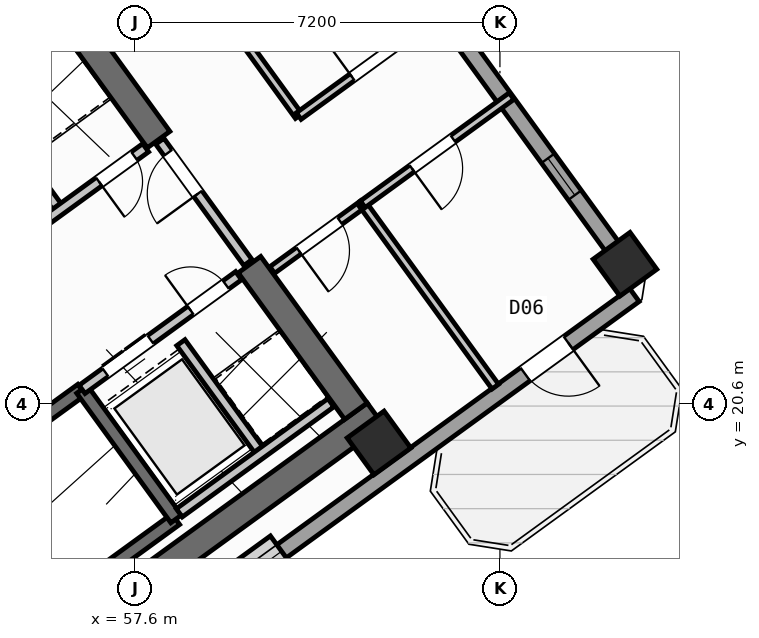
"""IFC4 building model, lengths in metres.
Left out: names, types, materials, properties, quantities, classifications, styles, units other than length and angle.
Written with IfcOpenShell. Run it as: python <this file> out.ifc"""

import sys

from ifc_helpers import new_model, si_unit, direction, frame, frame_2d, origin, origin_2d, place, context, subcontext, project, spatial, rectangle, hollow_rectangle, extrude, source, transform, mapped, element, fill, save


model = new_model("IFC4")
c1 = context("Model", 3, precision=1e-05, world=origin(), true_north=direction((0.0, 1.0)))
c2 = subcontext(c1, "Body", "Model", "MODEL_VIEW")
j1 = project(units=[si_unit("LENGTHUNIT", "METRE"), si_unit("PLANEANGLEUNIT", "RADIAN")], contexts=[c1])
p1 = place(None, origin())
s1 = spatial("IfcSite", under=j1, at=p1, CompositionType="ELEMENT")
p2 = place(p1, origin())
s2 = spatial("IfcBuilding", under=s1, at=p2, CompositionType="ELEMENT")
p3 = place(p2, frame((0.0, 0.0, 123.3)))
s3 = spatial("IfcBuildingStorey", under=s2, at=p3, CompositionType="ELEMENT", Elevation=123.3)
p4 = place(p3, frame((52.359, 13.14, 0.0), z_axis=(0.0, 0.0, 1.0), x_axis=(0.809014896919, 0.587788139183, 0.0)))
e1 = element("IfcWall", 1, at=p4, inside=s3, PredefinedType="SHEAR", context=c2, shape_type="SweptSolid", body=[
    extrude(rectangle(XDim=12.34, YDim=0.55, at=frame_2d((6.17, 0.0))), origin(), (0.0, 0.0, 1.0), 4.22),
])
p5 = place(p3, frame((61.958, 20.454, 0.0), z_axis=(0.0, 0.0, 1.0), x_axis=(-0.587802113096, 0.809004744015, 0.0)))
e2 = element("IfcWall", 2, at=p5, inside=s3, PredefinedType="SHEAR", context=c2, shape_type="SweptSolid", body=[
    extrude(rectangle(XDim=3.575, YDim=0.55, at=frame_2d((1.788, 0.0))), origin(), (0.0, 0.0, 1.0), 4.22),
])
p6 = place(p3, frame((58.064, 25.813, 0.0), z_axis=(0.0, 0.0, 1.0), x_axis=(-0.587764933797, 0.809031756236, 0.0)))
e3 = element("IfcWall", 3, at=p6, inside=s3, PredefinedType="SHEAR", context=c2, shape_type="SweptSolid", body=[
    extrude(rectangle(XDim=6.425, YDim=0.55, at=frame_2d((3.212, 0.0))), origin(), (0.0, 0.0, 1.0), 4.22),
])
m1 = source(origin(), c2, "Body", "SweptSolid", [
    extrude(hollow_rectangle(XDim=0.9, YDim=0.9, WallThickness=0.036, at=origin_2d()), origin(), (0.0, 0.0, 1.0), 4.5),
])
for number, where, z_axis, x_axis in (
    (4, (62.414, 19.827, 0.0), (0.0, 0.0, 1.0), (0.809, 0.588, 0.0)),
    (5, (67.268, 23.354, 0.0), (0.0, 0.0, 1.0), (0.809, 0.588, 0.0)),
):
    element("IfcColumn", number, at=place(p3, frame(where, z_axis=z_axis, x_axis=x_axis)), inside=s3, PredefinedType="COLUMN", context=c2, shape_type="MappedRepresentation", body=[
        mapped(m1, transform((0.0, 0.0, 0.0), scale=1.0)),
    ])
p7 = place(p3, frame((54.81, 40.5, 0.0), z_axis=(0.0, 0.0, 1.0), x_axis=(0.587783625747, -0.809018176127, 0.0)))
e6 = element("IfcWall", 6, at=p7, inside=s3, PredefinedType="STANDARD", context=c2, shape_type="SweptSolid", body=[
    extrude(rectangle(XDim=21.587, YDim=0.32, at=frame_2d((10.794, 0.0))), origin(), (0.0, 0.0, 1.0), 2.395),
])
p8 = place(p7, frame((1.681, 0.0, 1.0)))
e7 = element("IfcOpeningElement", 7, at=p8, cuts=e6, PredefinedType="OPENING", context=c2, shape_type="SweptSolid", body=[
    extrude(rectangle(XDim=0.9, YDim=1.25, at=frame_2d((0.45, 0.625))), frame((0.0, 0.17, 0.0), z_axis=(0.0, -1.0, 0.0), x_axis=(1.0, 0.0, 0.0)), (0.0, 0.0, 1.0), 0.34),
])
p9 = place(p7, frame((3.805, 0.0, 1.0)))
e8 = element("IfcOpeningElement", 8, at=p9, cuts=e6, PredefinedType="OPENING", context=c2, shape_type="SweptSolid", body=[
    extrude(rectangle(XDim=0.9, YDim=1.25, at=frame_2d((0.45, 0.625))), frame((0.0, 0.17, 0.0), z_axis=(0.0, -1.0, 0.0), x_axis=(1.0, 0.0, 0.0)), (0.0, 0.0, 1.0), 0.34),
])
p10 = place(p7, frame((8.369, 0.0, 1.0)))
e9 = element("IfcOpeningElement", 9, at=p10, cuts=e6, PredefinedType="OPENING", context=c2, shape_type="SweptSolid", body=[
    extrude(rectangle(XDim=0.9, YDim=1.25, at=frame_2d((0.45, 0.625))), frame((0.0, 0.17, 0.0), z_axis=(0.0, -1.0, 0.0), x_axis=(1.0, 0.0, 0.0)), (0.0, 0.0, 1.0), 0.34),
])
p11 = place(p7, frame((11.219, 0.0, 1.0)))
e10 = element("IfcOpeningElement", 10, at=p11, cuts=e6, PredefinedType="OPENING", context=c2, shape_type="SweptSolid", body=[
    extrude(rectangle(XDim=0.9, YDim=1.25, at=frame_2d((0.45, 0.625))), frame((0.0, 0.17, 0.0), z_axis=(0.0, -1.0, 0.0), x_axis=(1.0, 0.0, 0.0)), (0.0, 0.0, 1.0), 0.34),
])
p12 = place(p7, frame((18.609, 0.0, 1.0)))
e11 = element("IfcOpeningElement", 11, at=p12, cuts=e6, PredefinedType="OPENING", context=c2, shape_type="SweptSolid", body=[
    extrude(rectangle(XDim=0.9, YDim=1.25, at=frame_2d((0.45, 0.625))), frame((0.0, 0.17, 0.0), z_axis=(0.0, -1.0, 0.0), x_axis=(1.0, 0.0, 0.0)), (0.0, 0.0, 1.0), 0.34),
])
p13 = place(p3, frame((67.454, 22.747, 0.0), z_axis=(0.0, 0.0, 1.0), x_axis=(-0.809021120468, -0.587779573171, 0.0)))
e12 = element("IfcWall", 12, at=p13, inside=s3, PredefinedType="STANDARD", context=c2, shape_type="SweptSolid", body=[
    extrude(rectangle(XDim=17.588, YDim=0.32, at=frame_2d((8.794, 0.0))), origin(), (0.0, 0.0, 1.0), 4.22),
])
p14 = place(p13, frame((1.611, 0.0, 0.0)))
e13 = element("IfcOpeningElement", 13, at=p14, cuts=e12, PredefinedType="OPENING", context=c2, shape_type="SweptSolid", body=[
    extrude(rectangle(XDim=1.05, YDim=2.15, at=frame_2d((0.525, 1.075))), frame((0.0, 0.17, 0.0), z_axis=(0.0, -1.0, 0.0), x_axis=(1.0, 0.0, 0.0)), (0.0, 0.0, 1.0), 0.34),
])
p15 = place(p13, frame((8.606, 0.0, 0.8)))
e14 = element("IfcOpeningElement", 14, at=p15, cuts=e12, PredefinedType="OPENING", context=c2, shape_type="SweptSolid", body=[
    extrude(rectangle(XDim=2.1, YDim=1.55, at=frame_2d((1.05, 0.775))), frame((0.0, 0.17, 0.0), z_axis=(0.0, -1.0, 0.0), x_axis=(1.0, 0.0, 0.0)), (0.0, 0.0, 1.0), 0.34),
])
p16 = place(p13, frame((12.881, 0.0, 0.8)))
e15 = element("IfcOpeningElement", 15, at=p16, cuts=e12, PredefinedType="OPENING", context=c2, shape_type="SweptSolid", body=[
    extrude(rectangle(XDim=2.1, YDim=1.55, at=frame_2d((1.05, 0.775))), frame((0.0, 0.17, 0.0), z_axis=(0.0, -1.0, 0.0), x_axis=(1.0, 0.0, 0.0)), (0.0, 0.0, 1.0), 0.34),
])
p17 = place(p3, frame((49.863, 23.44, 0.0), z_axis=(0.0, 0.0, 1.0), x_axis=(0.809003474932, 0.587803859759, 0.0)))
e16 = element("IfcWall", 16, at=p17, inside=s3, PredefinedType="SHEAR", context=c2, shape_type="SweptSolid", body=[
    extrude(rectangle(XDim=7.46, YDim=0.26, at=frame_2d((3.73, 0.0))), origin(), (0.0, 0.0, 1.0), 4.22),
])
p18 = place(p17, frame((0.36, 0.0, 0.0)))
e17 = element("IfcOpeningElement", 17, at=p18, cuts=e16, PredefinedType="OPENING", context=c2, shape_type="SweptSolid", body=[
    extrude(rectangle(XDim=0.86, YDim=2.05, at=frame_2d((0.43, 1.025))), frame((0.0, 0.14, 0.0), z_axis=(0.0, -1.0, 0.0), x_axis=(1.0, 0.0, 0.0)), (0.0, 0.0, 1.0), 0.28),
])
p19 = place(p3, frame((52.472, 14.013, 0.0), z_axis=(0.0, 0.0, 1.0), x_axis=(0.809028366311, 0.587769599847, 0.0)))
e18 = element("IfcWall", 18, at=p19, inside=s3, PredefinedType="SHEAR", context=c2, shape_type="SweptSolid", body=[
    extrude(rectangle(XDim=7.33, YDim=0.26, at=frame_2d((3.665, 0.0))), origin(), (0.0, 0.0, 1.0), 4.22),
])
p20 = place(p3, frame((50.615, 16.57, 0.0), z_axis=(0.0, 0.0, 1.0), x_axis=(0.809028366311, 0.587769599847, 0.0)))
e19 = element("IfcWall", 19, at=p20, inside=s3, PredefinedType="SHEAR", context=c2, shape_type="SweptSolid", body=[
    extrude(rectangle(XDim=7.33, YDim=0.26, at=frame_2d((3.665, 0.0))), origin(), (0.0, 0.0, 1.0), 4.22),
])
p21 = place(p20, frame((0.22, 0.0, 0.0)))
e20 = element("IfcOpeningElement", 20, at=p21, cuts=e19, PredefinedType="OPENING", context=c2, shape_type="SweptSolid", body=[
    extrude(rectangle(XDim=1.1, YDim=2.1, at=frame_2d((0.55, 1.05))), frame((0.0, 0.14, 0.0), z_axis=(0.0, -1.0, 0.0), x_axis=(1.0, 0.0, 0.0)), (0.0, 0.0, 1.0), 0.28),
])
p22 = place(p3, frame((58.41, 18.327, 0.0), z_axis=(0.0, 0.0, 1.0), x_axis=(-0.58776738483, 0.809029975545, 0.0)))
e21 = element("IfcWall", 21, at=p22, inside=s3, PredefinedType="SHEAR", context=c2, shape_type="SweptSolid", body=[
    extrude(rectangle(XDim=3.16, YDim=0.26, at=frame_2d((1.58, 0.0))), origin(), (0.0, 0.0, 1.0), 4.22),
])
p23 = place(p3, frame((56.553, 20.884, 0.0), z_axis=(0.0, 0.0, 1.0), x_axis=(0.809023564264, 0.58777620951, 0.0)))
e22 = element("IfcWall", 22, at=p23, inside=s3, PredefinedType="STANDARD", context=c2, shape_type="SweptSolid", body=[
    extrude(rectangle(XDim=3.818, YDim=0.2, at=frame_2d((1.909, 0.0))), origin(), (0.0, 0.0, 1.0), 4.21),
])
p24 = place(p23, frame((0.57, 0.0, 0.0)))
e23 = element("IfcOpeningElement", 23, at=p24, cuts=e22, PredefinedType="OPENING", context=c2, shape_type="SweptSolid", body=[
    extrude(rectangle(XDim=1.1, YDim=2.15, at=frame_2d((0.55, 1.075))), frame((0.0, 0.11, 0.0), z_axis=(0.0, -1.0, 0.0), x_axis=(1.0, 0.0, 0.0)), (0.0, 0.0, 1.0), 0.22),
])
p25 = place(p23, frame((2.65, 0.0, 0.0)))
e24 = element("IfcOpeningElement", 24, at=p25, cuts=e22, PredefinedType="OPENING", context=c2, shape_type="SweptSolid", body=[
    extrude(rectangle(XDim=0.86, YDim=2.05, at=frame_2d((0.43, 1.025))), frame((0.0, 0.11, 0.0), z_axis=(0.0, -1.0, 0.0), x_axis=(1.0, 0.0, 0.0)), (0.0, 0.0, 1.0), 0.22),
])
p26 = place(p3, frame((60.067, 19.655, 0.0), z_axis=(0.0, 0.0, 1.0), x_axis=(-0.587800520745, 0.809005900975, 0.0)))
e25 = element("IfcWall", 25, at=p26, inside=s3, PredefinedType="STANDARD", context=c2, shape_type="SweptSolid", body=[
    extrude(rectangle(XDim=2.66, YDim=0.2, at=frame_2d((1.33, 0.0))), origin(), (0.0, 0.0, 1.0), 4.21),
])
p27 = place(p3, frame((58.472, 18.447, 0.0), z_axis=(0.0, 0.0, 1.0), x_axis=(0.809018631237, 0.587782999339, 0.0)))
e26 = element("IfcWall", 26, at=p27, inside=s3, PredefinedType="STANDARD", context=c2, shape_type="SweptSolid", body=[
    extrude(rectangle(XDim=3.698, YDim=0.2, at=frame_2d((1.849, 0.0))), origin(), (0.0, 0.0, 1.0), 4.21),
])
p28 = place(p3, frame((56.111, 24.419, 0.0), z_axis=(0.0, 0.0, 1.0), x_axis=(-0.58777848983, 0.809021907548, 0.0)))
e27 = element("IfcWall", 27, at=p28, inside=s3, PredefinedType="STANDARD", context=c2, shape_type="SweptSolid", body=[
    extrude(rectangle(XDim=2.88, YDim=0.2, at=frame_2d((1.44, 0.0))), origin(), (0.0, 0.0, 1.0), 4.21),
])
p29 = place(p3, frame((53.425, 22.468, 0.0), z_axis=(0.0, 0.0, 1.0), x_axis=(0.809024377198, 0.587775090574, 0.0)))
e28 = element("IfcWall", 28, at=p29, inside=s3, PredefinedType="STANDARD", context=c2, shape_type="SweptSolid", body=[
    extrude(rectangle(XDim=5.418, YDim=0.2, at=frame_2d((2.709, 0.0))), origin(), (0.0, 0.0, 1.0), 4.21),
])
p30 = place(p29, frame((4.28, 0.0, 0.0)))
e29 = element("IfcOpeningElement", 29, at=p30, cuts=e28, PredefinedType="OPENING", context=c2, shape_type="SweptSolid", body=[
    extrude(rectangle(XDim=0.86, YDim=2.05, at=frame_2d((0.43, 1.025))), frame((0.0, 0.11, 0.0), z_axis=(0.0, -1.0, 0.0), x_axis=(1.0, 0.0, 0.0)), (0.0, 0.0, 1.0), 0.22),
])
p31 = place(p29, frame((1.45, 0.0, 0.0)))
e30 = element("IfcOpeningElement", 30, at=p31, cuts=e28, PredefinedType="OPENING", context=c2, shape_type="SweptSolid", body=[
    extrude(rectangle(XDim=0.86, YDim=2.05, at=frame_2d((0.43, 1.025))), frame((0.0, 0.11, 0.0), z_axis=(0.0, -1.0, 0.0), x_axis=(1.0, 0.0, 0.0)), (0.0, 0.0, 1.0), 0.22),
])
p32 = place(p3, frame((59.827, 23.386, 0.0), z_axis=(0.0, 0.0, 1.0), x_axis=(-0.587803840107, 0.809003489211, 0.0)))
e31 = element("IfcWall", 31, at=p32, inside=s3, PredefinedType="STANDARD", context=c2, shape_type="SweptSolid", body=[
    extrude(rectangle(XDim=2.96, YDim=0.2, at=frame_2d((1.48, 0.0))), origin(), (0.0, 0.0, 1.0), 2.395),
])
p33 = place(p32, frame((1.68, 0.0, 0.0)))
e32 = element("IfcOpeningElement", 32, at=p33, cuts=e31, PredefinedType="OPENING", context=c2, shape_type="SweptSolid", body=[
    extrude(rectangle(XDim=1.0, YDim=2.1, at=frame_2d((0.5, 1.05))), frame((0.0, 0.11, 0.0), z_axis=(0.0, -1.0, 0.0), x_axis=(1.0, 0.0, 0.0)), (0.0, 0.0, 1.0), 0.22),
])
p34 = place(p3, frame((60.307, 23.24, 0.0), z_axis=(0.0, 0.0, 1.0), x_axis=(0.80898466188, 0.58782975158, 0.0)))
e33 = element("IfcWall", 33, at=p34, inside=s3, PredefinedType="PARTITIONING", context=c2, shape_type="SweptSolid", body=[
    extrude(rectangle(XDim=2.208, YDim=0.16, at=frame_2d((1.104, 0.0))), origin(), (0.0, 0.0, 1.0), 4.21),
])
p35 = place(p34, frame((0.648, 0.0, 0.0)))
e34 = element("IfcOpeningElement", 34, at=p35, cuts=e33, PredefinedType="OPENING", context=c2, shape_type="SweptSolid", body=[
    extrude(rectangle(XDim=1.0, YDim=2.1, at=frame_2d((0.5, 1.05))), frame((0.0, 0.09, 0.0), z_axis=(0.0, -1.0, 0.0), x_axis=(1.0, 0.0, 0.0)), (0.0, 0.0, 1.0), 0.18),
])
p36 = place(p3, frame((64.709, 20.938, 0.0), z_axis=(0.0, 0.0, 1.0), x_axis=(-0.587773666605, 0.809025411743, 0.0)))
e35 = element("IfcWall", 35, at=p36, inside=s3, PredefinedType="PARTITIONING", context=c2, shape_type="SweptSolid", body=[
    extrude(rectangle(XDim=4.45, YDim=0.16, at=frame_2d((2.225, 0.0))), origin(), (0.0, 0.0, 1.0), 4.21),
])
p37 = place(p3, frame((60.829, 26.278, 0.0), z_axis=(0.0, 0.0, 1.0), x_axis=(-0.587777474174, 0.809022645451, 0.0)))
e36 = element("IfcWall", 36, at=p37, inside=s3, PredefinedType="PARTITIONING", context=c2, shape_type="SweptSolid", body=[
    extrude(rectangle(XDim=15.1, YDim=0.16, at=frame_2d((7.55, 0.0))), origin(), (0.0, 0.0, 1.0), 4.21),
])
p38 = place(p3, frame((62.093, 24.538, 0.0), z_axis=(0.0, 0.0, 1.0), x_axis=(0.809035546126, 0.58775971715, 0.0)))
e37 = element("IfcWall", 37, at=p38, inside=s3, PredefinedType="PARTITIONING", context=c2, shape_type="SweptSolid", body=[
    extrude(rectangle(XDim=3.63, YDim=0.16, at=frame_2d((1.815, 0.0))), origin(), (0.0, 0.0, 1.0), 4.21),
])
p39 = place(p38, frame((1.2, 0.0, 0.0)))
e38 = element("IfcOpeningElement", 38, at=p39, cuts=e37, PredefinedType="OPENING", context=c2, shape_type="SweptSolid", body=[
    extrude(rectangle(XDim=1.0, YDim=2.1, at=frame_2d((0.5, 1.05))), frame((0.0, 0.09, 0.0), z_axis=(0.0, -1.0, 0.0), x_axis=(1.0, 0.0, 0.0)), (0.0, 0.0, 1.0), 0.18),
])
p40 = place(p3, frame((60.829, 26.278, 0.0), z_axis=(0.0, 0.0, 1.0), x_axis=(0.809003564202, 0.587803736896, 0.0)))
e39 = element("IfcWall", 39, at=p40, inside=s3, PredefinedType="PARTITIONING", context=c2, shape_type="SweptSolid", body=[
    extrude(rectangle(XDim=3.63, YDim=0.16, at=frame_2d((1.815, 0.0))), origin(), (0.0, 0.0, 1.0), 4.21),
])
p41 = place(p40, frame((1.305, 0.0, 0.0)))
e40 = element("IfcOpeningElement", 40, at=p41, cuts=e39, PredefinedType="OPENING", context=c2, shape_type="SweptSolid", body=[
    extrude(rectangle(XDim=1.0, YDim=2.1, at=frame_2d((0.5, 1.05))), frame((0.0, 0.09, 0.0), z_axis=(0.0, -1.0, 0.0), x_axis=(1.0, 0.0, 0.0)), (0.0, 0.0, 1.0), 0.18),
])
m2 = source(origin(), c2, "Body", "SweptSolid", [
    extrude(rectangle(XDim=1.05, YDim=2.15, at=frame_2d((0.525, 1.075))), frame((0.0, 0.025, 0.0), z_axis=(0.0, -1.0, 0.0), x_axis=(1.0, 0.0, 0.0)), (0.0, 0.0, 1.0), 0.05),
])
p42 = place(p14, origin())
e41 = element("IfcDoor", 41, at=p42, inside=s3, OperationType="SINGLE_SWING_LEFT", PredefinedType="DOOR", context=c2, shape_type="MappedRepresentation", body=[
    mapped(m2, transform((0.0, 0.0, 0.0), scale=1.0)),
])
fill(e13, e41)
m3 = source(origin(), c2, "Body", "SweptSolid", [
    extrude(rectangle(XDim=0.9, YDim=1.25, at=frame_2d((0.45, 0.625))), frame((0.0, 0.03, 0.0), z_axis=(0.0, -1.0, 0.0), x_axis=(1.0, 0.0, 0.0)), (0.0, 0.0, 1.0), 0.06),
])
p43 = place(p12, origin())
e42 = element("IfcWindow", 42, at=p43, inside=s3, PartitioningType="SINGLE_PANEL", PredefinedType="WINDOW", context=c2, shape_type="MappedRepresentation", body=[
    mapped(m3, transform((0.0, 0.0, 0.0), scale=1.0)),
])
fill(e11, e42)
m4 = source(origin(), c2, "Body", "SweptSolid", [
    extrude(rectangle(XDim=2.1, YDim=1.55, at=frame_2d((1.05, 0.775))), frame((0.0, 0.03, 0.0), z_axis=(0.0, -1.0, 0.0), x_axis=(1.0, 0.0, 0.0)), (0.0, 0.0, 1.0), 0.06),
])
p44 = place(p15, origin())
e43 = element("IfcWindow", 43, at=p44, inside=s3, PartitioningType="SINGLE_PANEL", PredefinedType="WINDOW", context=c2, shape_type="MappedRepresentation", body=[
    mapped(m4, transform((0.0, 0.0, 0.0), scale=1.0)),
])
fill(e14, e43)
m5 = source(origin(), c2, "Body", "SweptSolid", [
    extrude(rectangle(XDim=1.1, YDim=2.15, at=frame_2d((0.55, 1.075))), frame((0.0, 0.025, 0.0), z_axis=(0.0, -1.0, 0.0), x_axis=(1.0, 0.0, 0.0)), (0.0, 0.0, 1.0), 0.05),
])
p45 = place(p24, origin())
e44 = element("IfcDoor", 44, at=p45, inside=s3, OperationType="DOUBLE_DOOR_SLIDING", PredefinedType="DOOR", context=c2, shape_type="MappedRepresentation", body=[
    mapped(m5, transform((0.0, 0.0, 0.0), scale=1.0)),
])
fill(e23, e44)
m6 = source(origin(), c2, "Body", "SweptSolid", [
    extrude(rectangle(XDim=0.86, YDim=2.05, at=frame_2d((0.43, 1.025))), frame((0.0, 0.025, 0.0), z_axis=(0.0, -1.0, 0.0), x_axis=(1.0, 0.0, 0.0)), (0.0, 0.0, 1.0), 0.05),
])
p46 = place(p25, origin())
e45 = element("IfcDoor", 45, at=p46, inside=s3, OperationType="SINGLE_SWING_LEFT", PredefinedType="DOOR", context=c2, shape_type="MappedRepresentation", body=[
    mapped(m6, transform((0.0, 0.0, 0.0), scale=1.0)),
])
fill(e24, e45)
p47 = place(p30, frame((0.86, 0.0, 0.0), z_axis=(0.0, 0.0, 1.0), x_axis=(-1.0, 0.0, 0.0)))
e46 = element("IfcDoor", 46, at=p47, inside=s3, OperationType="SINGLE_SWING_RIGHT", PredefinedType="DOOR", context=c2, shape_type="MappedRepresentation", body=[
    mapped(m6, transform((0.0, 0.0, 0.0), scale=1.0)),
])
fill(e29, e46)
m7 = source(origin(), c2, "Body", "SweptSolid", [
    extrude(rectangle(XDim=1.0, YDim=2.1, at=frame_2d((0.5, 1.05))), frame((0.0, 0.025, 0.0), z_axis=(0.0, -1.0, 0.0), x_axis=(1.0, 0.0, 0.0)), (0.0, 0.0, 1.0), 0.05),
])
p48 = place(p35, frame((1.0, 0.0, 0.0), z_axis=(0.0, 0.0, 1.0), x_axis=(-1.0, 0.0, 0.0)))
e47 = element("IfcDoor", 47, at=p48, inside=s3, OperationType="SINGLE_SWING_RIGHT", PredefinedType="DOOR", context=c2, shape_type="MappedRepresentation", body=[
    mapped(m7, transform((0.0, 0.0, 0.0), scale=1.0)),
])
fill(e34, e47)
p49 = place(p33, origin())
e48 = element("IfcDoor", 48, at=p49, inside=s3, OperationType="SINGLE_SWING_LEFT", PredefinedType="DOOR", context=c2, shape_type="MappedRepresentation", body=[
    mapped(m7, transform((0.0, 0.0, 0.0), scale=1.0)),
])
fill(e32, e48)
p50 = place(p41, origin())
e49 = element("IfcDoor", 49, at=p50, inside=s3, OperationType="SINGLE_SWING_LEFT", PredefinedType="DOOR", context=c2, shape_type="MappedRepresentation", body=[
    mapped(m7, transform((0.0, 0.0, 0.0), scale=1.0)),
])
fill(e40, e49)
p51 = place(p39, frame((1.0, 0.0, 0.0), z_axis=(0.0, 0.0, 1.0), x_axis=(-1.0, 0.0, 0.0)))
e50 = element("IfcDoor", 50, at=p51, inside=s3, OperationType="SINGLE_SWING_RIGHT", PredefinedType="DOOR", context=c2, shape_type="MappedRepresentation", body=[
    mapped(m7, transform((0.0, 0.0, 0.0), scale=1.0)),
])
fill(e38, e50)
save(model, sys.argv[1])
